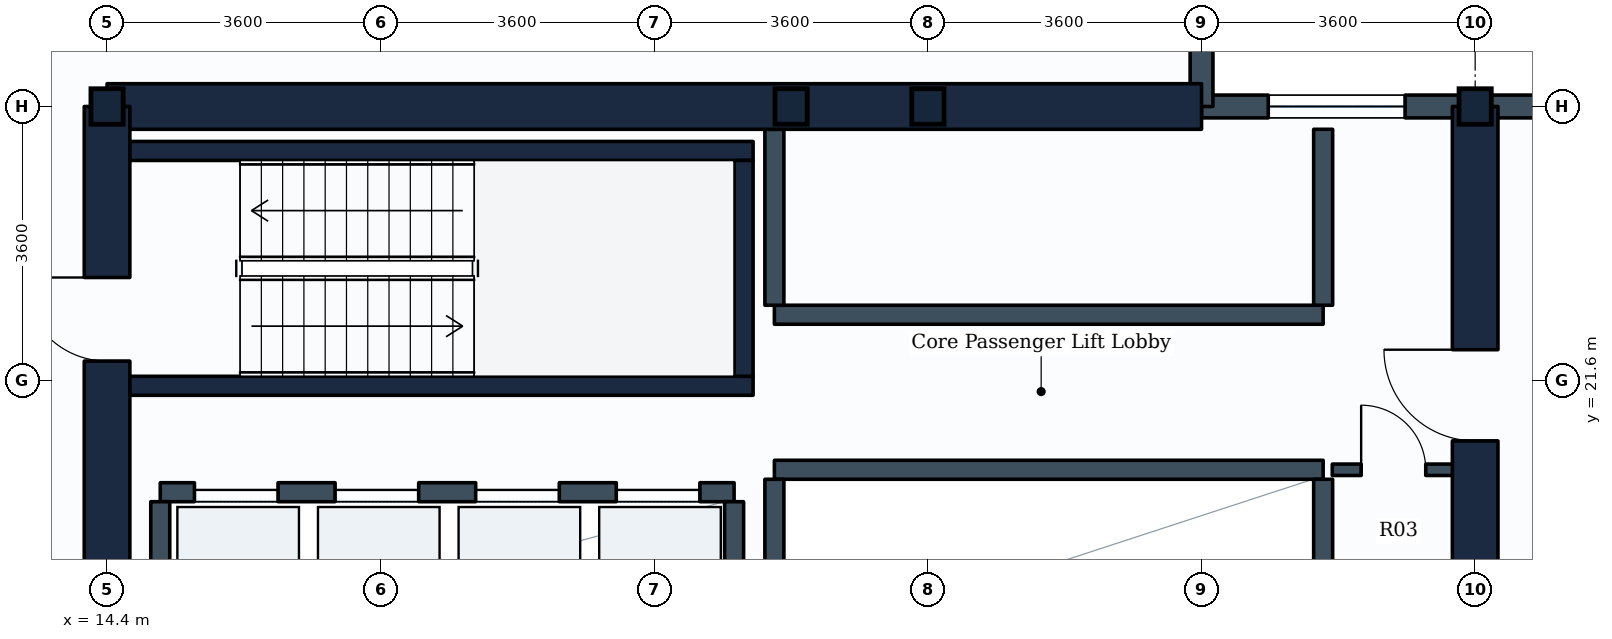
"""IFC4 building model, lengths in metres.
Left out: names, types, materials, properties, quantities, classifications, styles, units other than length and angle.
Written with IfcOpenShell. Run it as: python <this file> out.ifc"""

import sys

from ifc_helpers import new_model, si_unit, direction, frame, frame_2d, origin, origin_2d, place, context, subcontext, project, spatial, rectangle, i_section, extrude, element, fill, save


model = new_model("IFC4")
c1 = context("Model", 3, precision=1e-05, world=origin(), true_north=direction((0.0, 1.0)))
c2 = subcontext(c1, "Body", "Model", "MODEL_VIEW")
j1 = project(units=[si_unit("LENGTHUNIT", "METRE"), si_unit("PLANEANGLEUNIT", "RADIAN")], contexts=[c1])
p1 = place(None, origin())
s1 = spatial("IfcSite", under=j1, at=p1, CompositionType="ELEMENT")
p2 = place(p1, origin())
s2 = spatial("IfcBuilding", under=s1, at=p2, CompositionType="ELEMENT")
p3 = place(p2, frame((0.0, 0.0, 31.8)))
s3 = spatial("IfcBuildingStorey", under=s2, at=p3, CompositionType="ELEMENT", Elevation=31.8)
for number, where, z_axis, x_axis in (
    (1, (14.4, 25.2, 0.0), (0.0, 0.0, 1.0), (1.0, 0.0, 0.0)),
    (2, (23.4, 25.2, 0.0), (0.0, 0.0, 1.0), (1.0, 0.0, 0.0)),
    (3, (25.2, 25.2, 0.0), (0.0, 0.0, 1.0), (1.0, 0.0, 0.0)),
    (4, (32.4, 25.2, 0.0), (0.0, 0.0, 1.0), (1.0, 0.0, 0.0)),
):
    element("IfcColumn", number, at=place(p3, frame(where, z_axis=z_axis, x_axis=x_axis)), inside=s3, PredefinedType="COLUMN", context=c2, shape_type="SweptSolid", body=[
        extrude(i_section(OverallWidth=0.424, OverallDepth=0.467, WebThickness=0.033, FlangeThickness=0.053, FilletRadius=0.015, at=origin_2d()), origin(), (0.0, 0.0, 1.0), 3.9),
    ])
p4 = place(p3, frame((32.4, 25.2, 0.0), z_axis=(0.0, 0.0, 1.0), x_axis=(1.0, 0.0, 0.0)))
e5 = element("IfcWall", 5, at=p4, inside=s3, PredefinedType="STANDARD", context=c2, shape_type="SweptSolid", body=[
    extrude(rectangle(XDim=3.6, YDim=0.3, at=frame_2d((1.8, 0.0))), origin(), (0.0, 0.0, 1.0), 2.93),
])
p5 = place(p3, frame((28.8, 25.2, 0.0), z_axis=(0.0, 0.0, 1.0), x_axis=(1.0, 0.0, 0.0)))
e6 = element("IfcWall", 6, at=p5, inside=s3, PredefinedType="STANDARD", context=c2, shape_type="SweptSolid", body=[
    extrude(rectangle(XDim=3.6, YDim=0.3, at=frame_2d((1.8, 0.0))), origin(), (0.0, 0.0, 1.0), 3.635),
])
p6 = place(p5, frame((0.878, 0.0, 0.85)))
e7 = element("IfcOpeningElement", 7, at=p6, cuts=e6, PredefinedType="OPENING", context=c2, shape_type="SweptSolid", body=[
    extrude(rectangle(XDim=1.8, YDim=1.35, at=frame_2d((0.9, 0.675))), frame((0.0, 0.16, 0.0), z_axis=(0.0, -1.0, 0.0), x_axis=(1.0, 0.0, 0.0)), (0.0, 0.0, 1.0), 0.32),
])
p7 = place(p3, frame((28.8, 25.2, 0.0), z_axis=(0.0, 0.0, 1.0), x_axis=(0.0, 1.0, 0.0)))
e8 = element("IfcWall", 8, at=p7, inside=s3, PredefinedType="STANDARD", context=c2, shape_type="SweptSolid", body=[
    extrude(rectangle(XDim=3.6, YDim=0.3, at=frame_2d((1.8, 0.0))), origin(), (0.0, 0.0, 1.0), 3.14),
])
p8 = place(p3, frame((14.4, 25.2, 0.0), z_axis=(0.0, 0.0, 1.0), x_axis=(1.0, 0.0, 0.0)))
e9 = element("IfcWall", 9, at=p8, inside=s3, PredefinedType="SHEAR", context=c2, shape_type="SweptSolid", body=[
    extrude(rectangle(XDim=14.4, YDim=0.6, at=frame_2d((7.2, 0.0))), origin(), (0.0, 0.0, 1.0), 3.65),
])
p9 = place(p3, frame((14.4, 10.8, 0.0), z_axis=(0.0, 0.0, 1.0), x_axis=(0.0, 1.0, 0.0)))
e10 = element("IfcWall", 10, at=p9, inside=s3, PredefinedType="SHEAR", context=c2, shape_type="SweptSolid", body=[
    extrude(rectangle(XDim=14.4, YDim=0.6, at=frame_2d((7.2, 0.0))), origin(), (0.0, 0.0, 1.0), 3.65),
])
p10 = place(p9, frame((11.05, 0.0, 0.0)))
e11 = element("IfcOpeningElement", 11, at=p10, cuts=e10, PredefinedType="OPENING", context=c2, shape_type="SweptSolid", body=[
    extrude(rectangle(XDim=1.1, YDim=2.1, at=frame_2d((0.55, 1.05))), frame((0.0, 0.31, 0.0), z_axis=(0.0, -1.0, 0.0), x_axis=(1.0, 0.0, 0.0)), (0.0, 0.0, 1.0), 0.62),
])
p11 = place(p9, frame((4.9, 0.0, 0.0)))
e12 = element("IfcOpeningElement", 12, at=p11, cuts=e10, PredefinedType="OPENING", context=c2, shape_type="SweptSolid", body=[
    extrude(rectangle(XDim=1.2, YDim=2.1, at=frame_2d((0.6, 1.05))), frame((0.0, 0.31, 0.0), z_axis=(0.0, -1.0, 0.0), x_axis=(1.0, 0.0, 0.0)), (0.0, 0.0, 1.0), 0.62),
])
p12 = place(p3, frame((32.4, 10.8, 0.0), z_axis=(0.0, 0.0, 1.0), x_axis=(0.0, 1.0, 0.0)))
e13 = element("IfcWall", 13, at=p12, inside=s3, PredefinedType="SHEAR", context=c2, shape_type="SweptSolid", body=[
    extrude(rectangle(XDim=14.4, YDim=0.6, at=frame_2d((7.2, 0.0))), origin(), (0.0, 0.0, 1.0), 3.65),
])
p13 = place(p12, frame((4.35, 0.0, 0.0)))
e14 = element("IfcOpeningElement", 14, at=p13, cuts=e13, PredefinedType="OPENING", context=c2, shape_type="SweptSolid", body=[
    extrude(rectangle(XDim=1.2, YDim=2.1, at=frame_2d((0.6, 1.05))), frame((0.0, 0.31, 0.0), z_axis=(0.0, -1.0, 0.0), x_axis=(1.0, 0.0, 0.0)), (0.0, 0.0, 1.0), 0.62),
])
p14 = place(p12, frame((10.0, 0.0, 0.0)))
e15 = element("IfcOpeningElement", 15, at=p14, cuts=e13, PredefinedType="OPENING", context=c2, shape_type="SweptSolid", body=[
    extrude(rectangle(XDim=1.2, YDim=2.1, at=frame_2d((0.6, 1.05))), frame((0.0, 0.31, 0.0), z_axis=(0.0, -1.0, 0.0), x_axis=(1.0, 0.0, 0.0)), (0.0, 0.0, 1.0), 0.62),
])
for number, where, z_axis, x_axis in (
    (16, (14.7, 21.525, 0.0), (0.0, 0.0, 1.0), (1.0, 0.0, 0.0)),
    (17, (14.7, 24.615, 0.0), (0.0, 0.0, 1.0), (1.0, 0.0, 0.0)),
):
    element("IfcWall", number, at=place(p3, frame(where, z_axis=z_axis, x_axis=x_axis)), inside=s3, PredefinedType="SHEAR", context=c2, shape_type="SweptSolid", body=[
        extrude(rectangle(XDim=8.2, YDim=0.25, at=frame_2d((4.1, 0.0))), origin(), (0.0, 0.0, 1.0), 3.65),
    ])
p15 = place(p3, frame((22.775, 21.65, 0.0), z_axis=(0.0, 0.0, 1.0), x_axis=(0.0, 1.0, 0.0)))
e18 = element("IfcWall", 18, at=p15, inside=s3, PredefinedType="SHEAR", context=c2, shape_type="SweptSolid", body=[
    extrude(rectangle(XDim=2.84, YDim=0.25, at=frame_2d((1.42, 0.0))), origin(), (0.0, 0.0, 1.0), 3.65),
])
p16 = place(p3, frame((15.1, 20.125, 0.0), z_axis=(0.0, 0.0, 1.0), x_axis=(1.0, 0.0, 0.0)))
e19 = element("IfcWall", 19, at=p16, inside=s3, PredefinedType="PARTITIONING", context=c2, shape_type="SweptSolid", body=[
    extrude(rectangle(XDim=7.55, YDim=0.25, at=frame_2d((3.775, 0.0))), origin(), (0.0, 0.0, 1.0), 3.635),
])
p17 = place(p16, frame((0.45, 0.0, 0.0)))
e20 = element("IfcOpeningElement", 20, at=p17, cuts=e19, PredefinedType="OPENING", context=c2, shape_type="SweptSolid", body=[
    extrude(rectangle(XDim=1.1, YDim=2.1, at=frame_2d((0.55, 1.05))), frame((0.0, 0.135, 0.0), z_axis=(0.0, -1.0, 0.0), x_axis=(1.0, 0.0, 0.0)), (0.0, 0.0, 1.0), 0.27),
])
p18 = place(p16, frame((2.3, 0.0, 0.0)))
e21 = element("IfcOpeningElement", 21, at=p18, cuts=e19, PredefinedType="OPENING", context=c2, shape_type="SweptSolid", body=[
    extrude(rectangle(XDim=1.1, YDim=2.1, at=frame_2d((0.55, 1.05))), frame((0.0, 0.135, 0.0), z_axis=(0.0, -1.0, 0.0), x_axis=(1.0, 0.0, 0.0)), (0.0, 0.0, 1.0), 0.27),
])
p19 = place(p16, frame((4.15, 0.0, 0.0)))
e22 = element("IfcOpeningElement", 22, at=p19, cuts=e19, PredefinedType="OPENING", context=c2, shape_type="SweptSolid", body=[
    extrude(rectangle(XDim=1.1, YDim=2.1, at=frame_2d((0.55, 1.05))), frame((0.0, 0.135, 0.0), z_axis=(0.0, -1.0, 0.0), x_axis=(1.0, 0.0, 0.0)), (0.0, 0.0, 1.0), 0.27),
])
p20 = place(p16, frame((6.0, 0.0, 0.0)))
e23 = element("IfcOpeningElement", 23, at=p20, cuts=e19, PredefinedType="OPENING", context=c2, shape_type="SweptSolid", body=[
    extrude(rectangle(XDim=1.1, YDim=2.1, at=frame_2d((0.55, 1.05))), frame((0.0, 0.135, 0.0), z_axis=(0.0, -1.0, 0.0), x_axis=(1.0, 0.0, 0.0)), (0.0, 0.0, 1.0), 0.27),
])
for number, where, z_axis, x_axis in (
    (24, (15.1, 18.025, 0.0), (0.0, 0.0, 1.0), (0.0, 1.0, 0.0)),
    (25, (22.65, 18.025, 0.0), (0.0, 0.0, 1.0), (0.0, 1.0, 0.0)),
):
    element("IfcWall", number, at=place(p3, frame(where, z_axis=z_axis, x_axis=x_axis)), inside=s3, PredefinedType="PARTITIONING", context=c2, shape_type="SweptSolid", body=[
        extrude(rectangle(XDim=1.975, YDim=0.25, at=frame_2d((0.988, 0.0))), origin(), (0.0, 0.0, 1.0), 3.635),
    ])
p21 = place(p3, frame((23.18, 20.42, 0.0), z_axis=(0.0, 0.0, 1.0), x_axis=(1.0, 0.0, 0.0)))
e26 = element("IfcWall", 26, at=p21, inside=s3, PredefinedType="PARTITIONING", context=c2, shape_type="SweptSolid", body=[
    extrude(rectangle(XDim=7.22, YDim=0.25, at=frame_2d((3.61, 0.0))), origin(), (0.0, 0.0, 1.0), 3.635),
])
for number, where, z_axis, x_axis in (
    (27, (23.18, 18.025, 0.0), (0.0, 0.0, 1.0), (0.0, 1.0, 0.0)),
    (28, (30.4, 18.025, 0.0), (0.0, 0.0, 1.0), (0.0, 1.0, 0.0)),
):
    element("IfcWall", number, at=place(p3, frame(where, z_axis=z_axis, x_axis=x_axis)), inside=s3, PredefinedType="PARTITIONING", context=c2, shape_type="SweptSolid", body=[
        extrude(rectangle(XDim=2.27, YDim=0.25, at=frame_2d((1.135, 0.0))), origin(), (0.0, 0.0, 1.0), 3.635),
    ])
p22 = place(p3, frame((23.18, 22.46, 0.0), z_axis=(0.0, 0.0, 1.0), x_axis=(1.0, 0.0, 0.0)))
e29 = element("IfcWall", 29, at=p22, inside=s3, PredefinedType="PARTITIONING", context=c2, shape_type="SweptSolid", body=[
    extrude(rectangle(XDim=7.22, YDim=0.25, at=frame_2d((3.61, 0.0))), origin(), (0.0, 0.0, 1.0), 3.635),
])
for number, where, z_axis, x_axis in (
    (30, (23.18, 22.585, 0.0), (0.0, 0.0, 1.0), (0.0, 1.0, 0.0)),
    (31, (30.4, 22.585, 0.0), (0.0, 0.0, 1.0), (0.0, 1.0, 0.0)),
):
    element("IfcWall", number, at=place(p3, frame(where, z_axis=z_axis, x_axis=x_axis)), inside=s3, PredefinedType="PARTITIONING", context=c2, shape_type="SweptSolid", body=[
        extrude(rectangle(XDim=2.315, YDim=0.25, at=frame_2d((1.157, 0.0))), origin(), (0.0, 0.0, 1.0), 3.635),
    ])
p23 = place(p3, frame((30.52, 20.42, 0.0), z_axis=(0.0, 0.0, 1.0), x_axis=(1.0, 0.0, 0.0)))
e32 = element("IfcWall", 32, at=p23, inside=s3, PredefinedType="PARTITIONING", context=c2, shape_type="SweptSolid", body=[
    extrude(rectangle(XDim=1.63, YDim=0.15, at=frame_2d((0.815, 0.0))), origin(), (0.0, 0.0, 1.0), 3.635),
])
p24 = place(p23, frame((0.38, 0.0, 0.0)))
e33 = element("IfcOpeningElement", 33, at=p24, cuts=e32, PredefinedType="OPENING", context=c2, shape_type="SweptSolid", body=[
    extrude(rectangle(XDim=0.85, YDim=2.1, at=frame_2d((0.425, 1.05))), frame((0.0, 0.085, 0.0), z_axis=(0.0, -1.0, 0.0), x_axis=(1.0, 0.0, 0.0)), (0.0, 0.0, 1.0), 0.17),
])
p25 = place(p6, origin())
e34 = element("IfcWindow", 34, at=p25, inside=s3, PartitioningType="SINGLE_PANEL", PredefinedType="WINDOW", context=c2, shape_type="SweptSolid", body=[
    extrude(rectangle(XDim=1.8, YDim=1.35, at=frame_2d((0.9, 0.675))), frame((0.0, 0.03, 0.0), z_axis=(0.0, -1.0, 0.0), x_axis=(1.0, 0.0, 0.0)), (0.0, 0.0, 1.0), 0.06),
])
fill(e7, e34)
p26 = place(p10, origin())
e35 = element("IfcDoor", 35, at=p26, inside=s3, OperationType="SINGLE_SWING_RIGHT", PredefinedType="DOOR", context=c2, shape_type="SweptSolid", body=[
    extrude(rectangle(XDim=1.1, YDim=2.1, at=frame_2d((0.55, 1.05))), frame((0.0, 0.025, 0.0), z_axis=(0.0, -1.0, 0.0), x_axis=(1.0, 0.0, 0.0)), (0.0, 0.0, 1.0), 0.05),
])
fill(e11, e35)
p27 = place(p17, origin())
e36 = element("IfcDoor", 36, at=p27, inside=s3, OperationType="SLIDING_TO_LEFT", PredefinedType="DOOR", context=c2, shape_type="SweptSolid", body=[
    extrude(rectangle(XDim=1.1, YDim=2.1, at=frame_2d((0.55, 1.05))), frame((0.0, 0.025, 0.0), z_axis=(0.0, -1.0, 0.0), x_axis=(1.0, 0.0, 0.0)), (0.0, 0.0, 1.0), 0.05),
])
fill(e20, e36)
p28 = place(p18, origin())
e37 = element("IfcDoor", 37, at=p28, inside=s3, OperationType="SLIDING_TO_LEFT", PredefinedType="DOOR", context=c2, shape_type="SweptSolid", body=[
    extrude(rectangle(XDim=1.1, YDim=2.1, at=frame_2d((0.55, 1.05))), frame((0.0, 0.025, 0.0), z_axis=(0.0, -1.0, 0.0), x_axis=(1.0, 0.0, 0.0)), (0.0, 0.0, 1.0), 0.05),
])
fill(e21, e37)
p29 = place(p19, origin())
e38 = element("IfcDoor", 38, at=p29, inside=s3, OperationType="SLIDING_TO_LEFT", PredefinedType="DOOR", context=c2, shape_type="SweptSolid", body=[
    extrude(rectangle(XDim=1.1, YDim=2.1, at=frame_2d((0.55, 1.05))), frame((0.0, 0.025, 0.0), z_axis=(0.0, -1.0, 0.0), x_axis=(1.0, 0.0, 0.0)), (0.0, 0.0, 1.0), 0.05),
])
fill(e22, e38)
p30 = place(p20, origin())
e39 = element("IfcDoor", 39, at=p30, inside=s3, OperationType="SLIDING_TO_LEFT", PredefinedType="DOOR", context=c2, shape_type="SweptSolid", body=[
    extrude(rectangle(XDim=1.1, YDim=2.1, at=frame_2d((0.55, 1.05))), frame((0.0, 0.025, 0.0), z_axis=(0.0, -1.0, 0.0), x_axis=(1.0, 0.0, 0.0)), (0.0, 0.0, 1.0), 0.05),
])
fill(e23, e39)
p31 = place(p14, origin())
e40 = element("IfcDoor", 40, at=p31, inside=s3, OperationType="SINGLE_SWING_RIGHT", PredefinedType="DOOR", context=c2, shape_type="SweptSolid", body=[
    extrude(rectangle(XDim=1.2, YDim=2.1, at=frame_2d((0.6, 1.05))), frame((0.0, 0.025, 0.0), z_axis=(0.0, -1.0, 0.0), x_axis=(1.0, 0.0, 0.0)), (0.0, 0.0, 1.0), 0.05),
])
fill(e15, e40)
p32 = place(p24, origin())
e41 = element("IfcDoor", 41, at=p32, inside=s3, OperationType="SINGLE_SWING_LEFT", PredefinedType="DOOR", context=c2, shape_type="SweptSolid", body=[
    extrude(rectangle(XDim=0.85, YDim=2.1, at=frame_2d((0.425, 1.05))), frame((0.0, 0.025, 0.0), z_axis=(0.0, -1.0, 0.0), x_axis=(1.0, 0.0, 0.0)), (0.0, 0.0, 1.0), 0.05),
])
fill(e33, e41)
save(model, sys.argv[1])
